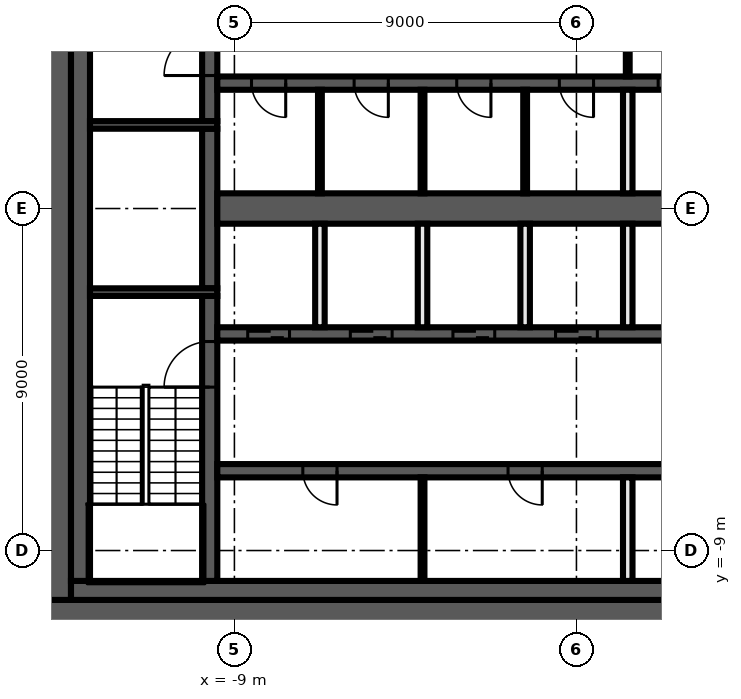
"""IFC4 building model, lengths in metres.
Left out: names, types, materials, properties, quantities, classifications, styles, units other than length and angle.
Written with IfcOpenShell. Run it as: python <this file> out.ifc"""

import sys

from ifc_helpers import new_model, si_unit, direction, frame, frame_2d, origin, place, context, subcontext, project, spatial, rectangle, extrude, element, fill, save


model = new_model("IFC4")
c1 = context("Model", 3, precision=1e-05, world=origin(), true_north=direction((0.0, 1.0)))
c2 = subcontext(c1, "Body", "Model", "MODEL_VIEW")
j1 = project(units=[si_unit("LENGTHUNIT", "METRE"), si_unit("PLANEANGLEUNIT", "RADIAN")], contexts=[c1])
p1 = place(None, origin())
s1 = spatial("IfcSite", under=j1, at=p1, CompositionType="ELEMENT")
p2 = place(p1, origin())
s2 = spatial("IfcBuilding", under=s1, at=p2, CompositionType="ELEMENT")
p3 = place(p2, frame((0.0, 0.0, 270.6)))
s3 = spatial("IfcBuildingStorey", under=s2, at=p3, CompositionType="ELEMENT", Elevation=270.6)
p4 = place(p3, frame((14.0, -10.65, 0.0), z_axis=(0.0, 0.0, 1.0), x_axis=(-1.0, 0.0, 0.0)))
e1 = element("IfcWall", 1, at=p4, inside=s3, PredefinedType="SHEAR", context=c2, shape_type="SweptSolid", body=[
    extrude(rectangle(XDim=28.0, YDim=0.7, at=frame_2d((14.0, 0.0))), origin(), (0.0, 0.0, 1.0), 3.82),
])
p5 = place(p4, frame((5.1, 0.0, 0.0)))
e2 = element("IfcOpeningElement", 2, at=p5, cuts=e1, PredefinedType="OPENING", context=c2, shape_type="SweptSolid", body=[
    extrude(rectangle(XDim=1.6, YDim=2.1, at=frame_2d((0.8, 1.05))), frame((0.0, 0.36, 0.0), z_axis=(0.0, -1.0, 0.0), x_axis=(1.0, 0.0, 0.0)), (0.0, 0.0, 1.0), 0.72),
])
p6 = place(p3, frame((-13.65, -10.3, 0.0), z_axis=(0.0, 0.0, 1.0), x_axis=(0.0, 1.0, 0.0)))
e3 = element("IfcWall", 3, at=p6, inside=s3, PredefinedType="SHEAR", context=c2, shape_type="SweptSolid", body=[
    extrude(rectangle(XDim=20.6, YDim=0.7, at=frame_2d((10.3, 0.0))), origin(), (0.0, 0.0, 1.0), 3.82),
])
p7 = place(p3, frame((6.9, -10.05, 0.0), z_axis=(0.0, 0.0, 1.0), x_axis=(-1.0, 0.0, 0.0)))
e4 = element("IfcWall", 4, at=p7, inside=s3, PredefinedType="SHEAR", context=c2, shape_type="SweptSolid", body=[
    extrude(rectangle(XDim=20.2, YDim=0.5, at=frame_2d((10.1, 0.0))), origin(), (0.0, 0.0, 1.0), 3.82),
])
p8 = place(p3, frame((-13.05, -9.8, 0.0), z_axis=(0.0, 0.0, 1.0), x_axis=(0.0, 1.0, 0.0)))
e5 = element("IfcWall", 5, at=p8, inside=s3, PredefinedType="SHEAR", context=c2, shape_type="SweptSolid", body=[
    extrude(rectangle(XDim=19.6, YDim=0.5, at=frame_2d((9.8, 0.0))), origin(), (0.0, 0.0, 1.0), 3.82),
])
p9 = place(p3, frame((-9.65, -9.8, 0.0), z_axis=(0.0, 0.0, 1.0), x_axis=(0.0, 1.0, 0.0)))
e6 = element("IfcWall", 6, at=p9, inside=s3, PredefinedType="SHEAR", context=c2, shape_type="SweptSolid", body=[
    extrude(rectangle(XDim=7.5, YDim=0.4, at=frame_2d((3.75, 0.0))), origin(), (0.0, 0.0, 1.0), 3.82),
])
p10 = place(p9, frame((5.1, 0.0, 0.0)))
e7 = element("IfcOpeningElement", 7, at=p10, cuts=e6, PredefinedType="OPENING", context=c2, shape_type="SweptSolid", body=[
    extrude(rectangle(XDim=1.2, YDim=2.1, at=frame_2d((0.6, 1.05))), frame((0.0, 0.21, 0.0), z_axis=(0.0, -1.0, 0.0), x_axis=(1.0, 0.0, 0.0)), (0.0, 0.0, 1.0), 0.42),
])
p11 = place(p3, frame((-9.65, -2.1, 0.0), z_axis=(0.0, 0.0, 1.0), x_axis=(0.0, 1.0, 0.0)))
e8 = element("IfcWall", 8, at=p11, inside=s3, PredefinedType="SHEAR", context=c2, shape_type="SweptSolid", body=[
    extrude(rectangle(XDim=4.2, YDim=0.4, at=frame_2d((2.1, 0.0))), origin(), (0.0, 0.0, 1.0), 3.82),
])
p12 = place(p3, frame((-9.65, 2.3, 0.0), z_axis=(0.0, 0.0, 1.0), x_axis=(0.0, 1.0, 0.0)))
e9 = element("IfcWall", 9, at=p12, inside=s3, PredefinedType="SHEAR", context=c2, shape_type="SweptSolid", body=[
    extrude(rectangle(XDim=7.5, YDim=0.4, at=frame_2d((3.75, 0.0))), origin(), (0.0, 0.0, 1.0), 3.82),
])
p13 = place(p12, frame((1.2, 0.0, 0.0)))
e10 = element("IfcOpeningElement", 10, at=p13, cuts=e9, PredefinedType="OPENING", context=c2, shape_type="SweptSolid", body=[
    extrude(rectangle(XDim=1.2, YDim=2.1, at=frame_2d((0.6, 1.05))), frame((0.0, 0.21, 0.0), z_axis=(0.0, -1.0, 0.0), x_axis=(1.0, 0.0, 0.0)), (0.0, 0.0, 1.0), 0.42),
])
for number, where, z_axis, x_axis in (
    (11, (-9.45, 2.2, 0.0), (0.0, 0.0, 1.0), (-1.0, 0.0, 0.0)),
    (12, (-9.45, -2.2, 0.0), (0.0, 0.0, 1.0), (-1.0, 0.0, 0.0)),
):
    element("IfcWall", number, at=place(p3, frame(where, z_axis=z_axis, x_axis=x_axis)), inside=s3, PredefinedType="SHEAR", context=c2, shape_type="SweptSolid", body=[
        extrude(rectangle(XDim=3.35, YDim=0.2, at=frame_2d((1.675, 0.0))), origin(), (0.0, 0.0, 1.0), 3.82),
    ])
p14 = place(p3, frame((9.45, 3.3, 0.0), z_axis=(0.0, 0.0, 1.0), x_axis=(-1.0, 0.0, 0.0)))
e13 = element("IfcWall", 13, at=p14, inside=s3, PredefinedType="SHEAR", context=c2, shape_type="SweptSolid", body=[
    extrude(rectangle(XDim=18.9, YDim=0.35, at=frame_2d((9.45, 0.0))), origin(), (0.0, 0.0, 1.0), 3.82),
])
p15 = place(p14, frame((6.2, 0.0, 0.0)))
e14 = element("IfcOpeningElement", 14, at=p15, cuts=e13, PredefinedType="OPENING", context=c2, shape_type="SweptSolid", body=[
    extrude(rectangle(XDim=1.1, YDim=2.1, at=frame_2d((0.55, 1.05))), frame((0.0, 0.185, 0.0), z_axis=(0.0, -1.0, 0.0), x_axis=(1.0, 0.0, 0.0)), (0.0, 0.0, 1.0), 0.37),
])
p16 = place(p14, frame((3.5, 0.0, 0.0)))
e15 = element("IfcOpeningElement", 15, at=p16, cuts=e13, PredefinedType="OPENING", context=c2, shape_type="SweptSolid", body=[
    extrude(rectangle(XDim=1.1, YDim=2.1, at=frame_2d((0.55, 1.05))), frame((0.0, 0.185, 0.0), z_axis=(0.0, -1.0, 0.0), x_axis=(1.0, 0.0, 0.0)), (0.0, 0.0, 1.0), 0.37),
])
p17 = place(p14, frame((0.9, 0.0, 0.0)))
e16 = element("IfcOpeningElement", 16, at=p17, cuts=e13, PredefinedType="OPENING", context=c2, shape_type="SweptSolid", body=[
    extrude(rectangle(XDim=0.9, YDim=2.1, at=frame_2d((0.45, 1.05))), frame((0.0, 0.185, 0.0), z_axis=(0.0, -1.0, 0.0), x_axis=(1.0, 0.0, 0.0)), (0.0, 0.0, 1.0), 0.37),
])
p18 = place(p14, frame((17.1, 0.0, 0.0)))
e17 = element("IfcOpeningElement", 17, at=p18, cuts=e13, PredefinedType="OPENING", context=c2, shape_type="SweptSolid", body=[
    extrude(rectangle(XDim=0.9, YDim=2.1, at=frame_2d((0.45, 1.05))), frame((0.0, 0.185, 0.0), z_axis=(0.0, -1.0, 0.0), x_axis=(1.0, 0.0, 0.0)), (0.0, 0.0, 1.0), 0.37),
])
p19 = place(p14, frame((14.4, 0.0, 0.0)))
e18 = element("IfcOpeningElement", 18, at=p19, cuts=e13, PredefinedType="OPENING", context=c2, shape_type="SweptSolid", body=[
    extrude(rectangle(XDim=0.9, YDim=2.1, at=frame_2d((0.45, 1.05))), frame((0.0, 0.185, 0.0), z_axis=(0.0, -1.0, 0.0), x_axis=(1.0, 0.0, 0.0)), (0.0, 0.0, 1.0), 0.37),
])
p20 = place(p14, frame((11.7, 0.0, 0.0)))
e19 = element("IfcOpeningElement", 19, at=p20, cuts=e13, PredefinedType="OPENING", context=c2, shape_type="SweptSolid", body=[
    extrude(rectangle(XDim=0.9, YDim=2.1, at=frame_2d((0.45, 1.05))), frame((0.0, 0.185, 0.0), z_axis=(0.0, -1.0, 0.0), x_axis=(1.0, 0.0, 0.0)), (0.0, 0.0, 1.0), 0.37),
])
p21 = place(p14, frame((9.0, 0.0, 0.0)))
e20 = element("IfcOpeningElement", 20, at=p21, cuts=e13, PredefinedType="OPENING", context=c2, shape_type="SweptSolid", body=[
    extrude(rectangle(XDim=0.9, YDim=2.1, at=frame_2d((0.45, 1.05))), frame((0.0, 0.185, 0.0), z_axis=(0.0, -1.0, 0.0), x_axis=(1.0, 0.0, 0.0)), (0.0, 0.0, 1.0), 0.37),
])
p22 = place(p3, frame((-9.45, -3.3, 0.0), z_axis=(0.0, 0.0, 1.0), x_axis=(1.0, 0.0, 0.0)))
e21 = element("IfcWall", 21, at=p22, inside=s3, PredefinedType="SHEAR", context=c2, shape_type="SweptSolid", body=[
    extrude(rectangle(XDim=18.9, YDim=0.35, at=frame_2d((9.45, 0.0))), origin(), (0.0, 0.0, 1.0), 3.82),
])
p23 = place(p22, frame((0.8, 0.0, 0.0)))
e22 = element("IfcOpeningElement", 22, at=p23, cuts=e21, PredefinedType="OPENING", context=c2, shape_type="SweptSolid", body=[
    extrude(rectangle(XDim=1.1, YDim=2.1, at=frame_2d((0.55, 1.05))), frame((0.0, 0.185, 0.0), z_axis=(0.0, -1.0, 0.0), x_axis=(1.0, 0.0, 0.0)), (0.0, 0.0, 1.0), 0.37),
])
p24 = place(p22, frame((3.5, 0.0, 0.0)))
e23 = element("IfcOpeningElement", 23, at=p24, cuts=e21, PredefinedType="OPENING", context=c2, shape_type="SweptSolid", body=[
    extrude(rectangle(XDim=1.1, YDim=2.1, at=frame_2d((0.55, 1.05))), frame((0.0, 0.185, 0.0), z_axis=(0.0, -1.0, 0.0), x_axis=(1.0, 0.0, 0.0)), (0.0, 0.0, 1.0), 0.37),
])
p25 = place(p22, frame((6.2, 0.0, 0.0)))
e24 = element("IfcOpeningElement", 24, at=p25, cuts=e21, PredefinedType="OPENING", context=c2, shape_type="SweptSolid", body=[
    extrude(rectangle(XDim=1.1, YDim=2.1, at=frame_2d((0.55, 1.05))), frame((0.0, 0.185, 0.0), z_axis=(0.0, -1.0, 0.0), x_axis=(1.0, 0.0, 0.0)), (0.0, 0.0, 1.0), 0.37),
])
p26 = place(p22, frame((8.9, 0.0, 0.0)))
e25 = element("IfcOpeningElement", 25, at=p26, cuts=e21, PredefinedType="OPENING", context=c2, shape_type="SweptSolid", body=[
    extrude(rectangle(XDim=1.1, YDim=2.1, at=frame_2d((0.55, 1.05))), frame((0.0, 0.185, 0.0), z_axis=(0.0, -1.0, 0.0), x_axis=(1.0, 0.0, 0.0)), (0.0, 0.0, 1.0), 0.37),
])
p27 = place(p22, frame((17.0, 0.0, 0.0)))
e26 = element("IfcOpeningElement", 26, at=p27, cuts=e21, PredefinedType="OPENING", context=c2, shape_type="SweptSolid", body=[
    extrude(rectangle(XDim=1.1, YDim=2.1, at=frame_2d((0.55, 1.05))), frame((0.0, 0.185, 0.0), z_axis=(0.0, -1.0, 0.0), x_axis=(1.0, 0.0, 0.0)), (0.0, 0.0, 1.0), 0.37),
])
p28 = place(p22, frame((13.05, 0.0, 0.0)))
e27 = element("IfcOpeningElement", 27, at=p28, cuts=e21, PredefinedType="OPENING", context=c2, shape_type="SweptSolid", body=[
    extrude(rectangle(XDim=0.9, YDim=2.1, at=frame_2d((0.45, 1.05))), frame((0.0, 0.185, 0.0), z_axis=(0.0, -1.0, 0.0), x_axis=(1.0, 0.0, 0.0)), (0.0, 0.0, 1.0), 0.37),
])
p29 = place(p3, frame((9.45, -6.9, 0.0), z_axis=(0.0, 0.0, 1.0), x_axis=(-1.0, 0.0, 0.0)))
e28 = element("IfcWall", 28, at=p29, inside=s3, PredefinedType="SHEAR", context=c2, shape_type="SweptSolid", body=[
    extrude(rectangle(XDim=18.9, YDim=0.35, at=frame_2d((9.45, 0.0))), origin(), (0.0, 0.0, 1.0), 3.82),
])
p30 = place(p29, frame((0.75, 0.0, 0.0)))
e29 = element("IfcOpeningElement", 29, at=p30, cuts=e28, PredefinedType="OPENING", context=c2, shape_type="SweptSolid", body=[
    extrude(rectangle(XDim=1.2, YDim=2.1, at=frame_2d((0.6, 1.05))), frame((0.0, 0.185, 0.0), z_axis=(0.0, -1.0, 0.0), x_axis=(1.0, 0.0, 0.0)), (0.0, 0.0, 1.0), 0.37),
])
p31 = place(p29, frame((15.75, 0.0, 0.0)))
e30 = element("IfcOpeningElement", 30, at=p31, cuts=e28, PredefinedType="OPENING", context=c2, shape_type="SweptSolid", body=[
    extrude(rectangle(XDim=0.9, YDim=2.1, at=frame_2d((0.45, 1.05))), frame((0.0, 0.185, 0.0), z_axis=(0.0, -1.0, 0.0), x_axis=(1.0, 0.0, 0.0)), (0.0, 0.0, 1.0), 0.37),
])
p32 = place(p29, frame((10.35, 0.0, 0.0)))
e31 = element("IfcOpeningElement", 31, at=p32, cuts=e28, PredefinedType="OPENING", context=c2, shape_type="SweptSolid", body=[
    extrude(rectangle(XDim=0.9, YDim=2.1, at=frame_2d((0.45, 1.05))), frame((0.0, 0.185, 0.0), z_axis=(0.0, -1.0, 0.0), x_axis=(1.0, 0.0, 0.0)), (0.0, 0.0, 1.0), 0.37),
])
p33 = place(p3, frame((-9.45, 0.0, 0.0), z_axis=(0.0, 0.0, 1.0), x_axis=(1.0, 0.0, 0.0)))
e32 = element("IfcWall", 32, at=p33, inside=s3, PredefinedType="SHEAR", context=c2, shape_type="SweptSolid", body=[
    extrude(rectangle(XDim=18.9, YDim=0.8, at=frame_2d((9.45, 0.0))), origin(), (0.0, 0.0, 1.0), 3.82),
])
p34 = place(p3, frame((1.35, 6.725, 0.0), z_axis=(0.0, 0.0, 1.0), x_axis=(0.0, -1.0, 0.0)))
e33 = element("IfcWall", 33, at=p34, inside=s3, PredefinedType="PARTITIONING", context=c2, shape_type="SweptSolid", body=[
    extrude(rectangle(XDim=3.25, YDim=0.1, at=frame_2d((1.625, 0.0))), origin(), (0.0, 0.0, 1.0), 3.82),
])
p35 = place(p34, frame((1.025, 0.0, 0.0)))
e34 = element("IfcOpeningElement", 34, at=p35, cuts=e33, PredefinedType="OPENING", context=c2, shape_type="SweptSolid", body=[
    extrude(rectangle(XDim=1.2, YDim=2.1, at=frame_2d((0.6, 1.05))), frame((0.0, 0.06, 0.0), z_axis=(0.0, -1.0, 0.0), x_axis=(1.0, 0.0, 0.0)), (0.0, 0.0, 1.0), 0.12),
])
for number, where, z_axis, x_axis in (
    (35, (1.35, -9.8, 0.0), (0.0, 0.0, 1.0), (0.0, 1.0, 0.0)),
    (36, (1.35, -3.125, 0.0), (0.0, 0.0, 1.0), (0.0, 1.0, 0.0)),
    (37, (1.35, 0.4, 0.0), (0.0, 0.0, 1.0), (0.0, 1.0, 0.0)),
):
    element("IfcWall", number, at=place(p3, frame(where, z_axis=z_axis, x_axis=x_axis)), inside=s3, PredefinedType="SOLIDWALL", context=c2, shape_type="SweptSolid", body=[
        extrude(rectangle(XDim=2.725, YDim=0.25, at=frame_2d((1.363, 0.0))), origin(), (0.0, 0.0, 1.0), 3.82),
    ])
p36 = place(p3, frame((-1.35, 0.4, 0.0), z_axis=(0.0, 0.0, 1.0), x_axis=(0.0, 1.0, 0.0)))
e38 = element("IfcWall", 38, at=p36, inside=s3, PredefinedType="PARTITIONING", context=c2, shape_type="SweptSolid", body=[
    extrude(rectangle(XDim=2.725, YDim=0.1, at=frame_2d((1.363, 0.0))), origin(), (0.0, 0.0, 1.0), 3.82),
])
p37 = place(p3, frame((-1.35, -3.125, 0.0), z_axis=(0.0, 0.0, 1.0), x_axis=(0.0, 1.0, 0.0)))
e39 = element("IfcWall", 39, at=p37, inside=s3, PredefinedType="SOLIDWALL", context=c2, shape_type="SweptSolid", body=[
    extrude(rectangle(XDim=2.725, YDim=0.25, at=frame_2d((1.363, 0.0))), origin(), (0.0, 0.0, 1.0), 3.82),
])
for number, where, z_axis, x_axis in (
    (40, (-4.05, -9.8, 0.0), (0.0, 0.0, 1.0), (0.0, 1.0, 0.0)),
    (41, (-4.05, 0.4, 0.0), (0.0, 0.0, 1.0), (0.0, 1.0, 0.0)),
):
    element("IfcWall", number, at=place(p3, frame(where, z_axis=z_axis, x_axis=x_axis)), inside=s3, PredefinedType="PARTITIONING", context=c2, shape_type="SweptSolid", body=[
        extrude(rectangle(XDim=2.725, YDim=0.1, at=frame_2d((1.363, 0.0))), origin(), (0.0, 0.0, 1.0), 3.82),
    ])
p38 = place(p3, frame((-4.05, -3.125, 0.0), z_axis=(0.0, 0.0, 1.0), x_axis=(0.0, 1.0, 0.0)))
e42 = element("IfcWall", 42, at=p38, inside=s3, PredefinedType="SOLIDWALL", context=c2, shape_type="SweptSolid", body=[
    extrude(rectangle(XDim=2.725, YDim=0.25, at=frame_2d((1.363, 0.0))), origin(), (0.0, 0.0, 1.0), 3.82),
])
p39 = place(p3, frame((-6.75, 0.4, 0.0), z_axis=(0.0, 0.0, 1.0), x_axis=(0.0, 1.0, 0.0)))
e43 = element("IfcWall", 43, at=p39, inside=s3, PredefinedType="PARTITIONING", context=c2, shape_type="SweptSolid", body=[
    extrude(rectangle(XDim=2.725, YDim=0.1, at=frame_2d((1.363, 0.0))), origin(), (0.0, 0.0, 1.0), 3.82),
])
p40 = place(p3, frame((-6.75, -3.125, 0.0), z_axis=(0.0, 0.0, 1.0), x_axis=(0.0, 1.0, 0.0)))
e44 = element("IfcWall", 44, at=p40, inside=s3, PredefinedType="SOLIDWALL", context=c2, shape_type="SweptSolid", body=[
    extrude(rectangle(XDim=2.725, YDim=0.25, at=frame_2d((1.363, 0.0))), origin(), (0.0, 0.0, 1.0), 3.82),
])
p41 = place(p15, origin())
e45 = element("IfcDoor", 45, at=p41, inside=s3, OperationType="DOUBLE_DOOR_SLIDING", PredefinedType="DOOR", context=c2, shape_type="SweptSolid", body=[
    extrude(rectangle(XDim=1.1, YDim=2.1, at=frame_2d((0.55, 1.05))), frame((0.0, 0.025, 0.0), z_axis=(0.0, -1.0, 0.0), x_axis=(1.0, 0.0, 0.0)), (0.0, 0.0, 1.0), 0.05),
])
fill(e14, e45)
p42 = place(p23, origin())
e46 = element("IfcDoor", 46, at=p42, inside=s3, OperationType="DOUBLE_DOOR_SLIDING", PredefinedType="DOOR", context=c2, shape_type="SweptSolid", body=[
    extrude(rectangle(XDim=1.1, YDim=2.1, at=frame_2d((0.55, 1.05))), frame((0.0, 0.025, 0.0), z_axis=(0.0, -1.0, 0.0), x_axis=(1.0, 0.0, 0.0)), (0.0, 0.0, 1.0), 0.05),
])
fill(e22, e46)
p43 = place(p24, origin())
e47 = element("IfcDoor", 47, at=p43, inside=s3, OperationType="DOUBLE_DOOR_SLIDING", PredefinedType="DOOR", context=c2, shape_type="SweptSolid", body=[
    extrude(rectangle(XDim=1.1, YDim=2.1, at=frame_2d((0.55, 1.05))), frame((0.0, 0.025, 0.0), z_axis=(0.0, -1.0, 0.0), x_axis=(1.0, 0.0, 0.0)), (0.0, 0.0, 1.0), 0.05),
])
fill(e23, e47)
p44 = place(p25, origin())
e48 = element("IfcDoor", 48, at=p44, inside=s3, OperationType="DOUBLE_DOOR_SLIDING", PredefinedType="DOOR", context=c2, shape_type="SweptSolid", body=[
    extrude(rectangle(XDim=1.1, YDim=2.1, at=frame_2d((0.55, 1.05))), frame((0.0, 0.025, 0.0), z_axis=(0.0, -1.0, 0.0), x_axis=(1.0, 0.0, 0.0)), (0.0, 0.0, 1.0), 0.05),
])
fill(e24, e48)
p45 = place(p26, origin())
e49 = element("IfcDoor", 49, at=p45, inside=s3, OperationType="DOUBLE_DOOR_SLIDING", PredefinedType="DOOR", context=c2, shape_type="SweptSolid", body=[
    extrude(rectangle(XDim=1.1, YDim=2.1, at=frame_2d((0.55, 1.05))), frame((0.0, 0.025, 0.0), z_axis=(0.0, -1.0, 0.0), x_axis=(1.0, 0.0, 0.0)), (0.0, 0.0, 1.0), 0.05),
])
fill(e25, e49)
p46 = place(p18, origin())
e50 = element("IfcDoor", 50, at=p46, inside=s3, OperationType="SINGLE_SWING_RIGHT", PredefinedType="DOOR", context=c2, shape_type="SweptSolid", body=[
    extrude(rectangle(XDim=0.9, YDim=2.1, at=frame_2d((0.45, 1.05))), frame((0.0, 0.025, 0.0), z_axis=(0.0, -1.0, 0.0), x_axis=(1.0, 0.0, 0.0)), (0.0, 0.0, 1.0), 0.05),
])
fill(e17, e50)
p47 = place(p19, origin())
e51 = element("IfcDoor", 51, at=p47, inside=s3, OperationType="SINGLE_SWING_LEFT", PredefinedType="DOOR", context=c2, shape_type="SweptSolid", body=[
    extrude(rectangle(XDim=0.9, YDim=2.1, at=frame_2d((0.45, 1.05))), frame((0.0, 0.025, 0.0), z_axis=(0.0, -1.0, 0.0), x_axis=(1.0, 0.0, 0.0)), (0.0, 0.0, 1.0), 0.05),
])
fill(e18, e51)
p48 = place(p20, origin())
e52 = element("IfcDoor", 52, at=p48, inside=s3, OperationType="SINGLE_SWING_RIGHT", PredefinedType="DOOR", context=c2, shape_type="SweptSolid", body=[
    extrude(rectangle(XDim=0.9, YDim=2.1, at=frame_2d((0.45, 1.05))), frame((0.0, 0.025, 0.0), z_axis=(0.0, -1.0, 0.0), x_axis=(1.0, 0.0, 0.0)), (0.0, 0.0, 1.0), 0.05),
])
fill(e19, e52)
p49 = place(p21, origin())
e53 = element("IfcDoor", 53, at=p49, inside=s3, OperationType="SINGLE_SWING_LEFT", PredefinedType="DOOR", context=c2, shape_type="SweptSolid", body=[
    extrude(rectangle(XDim=0.9, YDim=2.1, at=frame_2d((0.45, 1.05))), frame((0.0, 0.025, 0.0), z_axis=(0.0, -1.0, 0.0), x_axis=(1.0, 0.0, 0.0)), (0.0, 0.0, 1.0), 0.05),
])
fill(e20, e53)
p50 = place(p31, origin())
e54 = element("IfcDoor", 54, at=p50, inside=s3, OperationType="SINGLE_SWING_LEFT", PredefinedType="DOOR", context=c2, shape_type="SweptSolid", body=[
    extrude(rectangle(XDim=0.9, YDim=2.1, at=frame_2d((0.45, 1.05))), frame((0.0, 0.025, 0.0), z_axis=(0.0, -1.0, 0.0), x_axis=(1.0, 0.0, 0.0)), (0.0, 0.0, 1.0), 0.05),
])
fill(e30, e54)
p51 = place(p32, origin())
e55 = element("IfcDoor", 55, at=p51, inside=s3, OperationType="SINGLE_SWING_RIGHT", PredefinedType="DOOR", context=c2, shape_type="SweptSolid", body=[
    extrude(rectangle(XDim=0.9, YDim=2.1, at=frame_2d((0.45, 1.05))), frame((0.0, 0.025, 0.0), z_axis=(0.0, -1.0, 0.0), x_axis=(1.0, 0.0, 0.0)), (0.0, 0.0, 1.0), 0.05),
])
fill(e31, e55)
p52 = place(p13, origin())
e56 = element("IfcDoor", 56, at=p52, inside=s3, OperationType="SINGLE_SWING_RIGHT", PredefinedType="DOOR", context=c2, shape_type="SweptSolid", body=[
    extrude(rectangle(XDim=1.2, YDim=2.1, at=frame_2d((0.6, 1.05))), frame((0.0, 0.025, 0.0), z_axis=(0.0, -1.0, 0.0), x_axis=(1.0, 0.0, 0.0)), (0.0, 0.0, 1.0), 0.05),
])
fill(e10, e56)
p53 = place(p10, origin())
e57 = element("IfcDoor", 57, at=p53, inside=s3, OperationType="SINGLE_SWING_LEFT", PredefinedType="DOOR", context=c2, shape_type="SweptSolid", body=[
    extrude(rectangle(XDim=1.2, YDim=2.1, at=frame_2d((0.6, 1.05))), frame((0.0, 0.025, 0.0), z_axis=(0.0, -1.0, 0.0), x_axis=(1.0, 0.0, 0.0)), (0.0, 0.0, 1.0), 0.05),
])
fill(e7, e57)
save(model, sys.argv[1])
